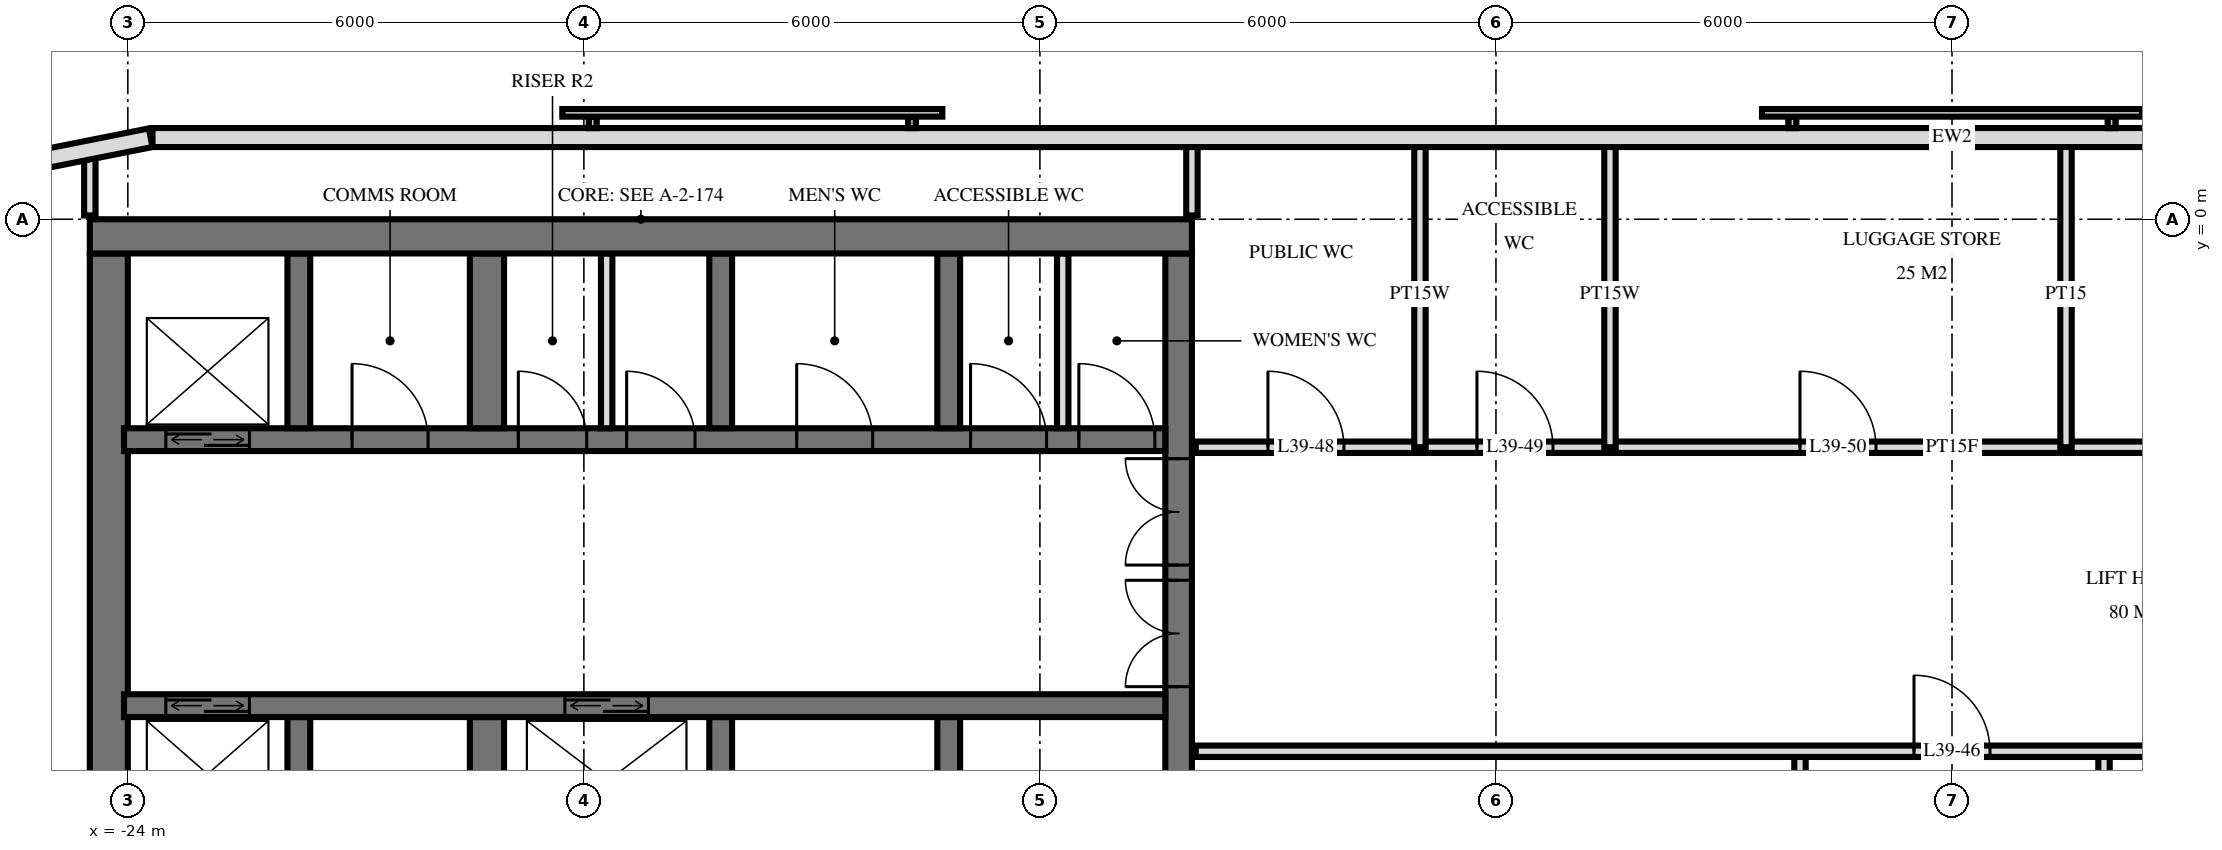
"""IFC4 building model, lengths in metres.
Left out: names, types, materials, properties, quantities, classifications, styles, units other than length and angle.
Written with IfcOpenShell. Run it as: python <this file> out.ifc"""

import sys

from ifc_helpers import new_model, si_unit, direction, frame, frame_2d, origin, place, context, subcontext, project, spatial, rectangle, extrude, element, fill, save


model = new_model("IFC4")
c1 = context("Model", 3, precision=1e-05, world=origin(), true_north=direction((0.0, 1.0)))
c2 = subcontext(c1, "Body", "Model", "MODEL_VIEW")
j1 = project(units=[si_unit("LENGTHUNIT", "METRE"), si_unit("PLANEANGLEUNIT", "RADIAN")], contexts=[c1])
p1 = place(None, origin())
s1 = spatial("IfcSite", under=j1, at=p1, CompositionType="ELEMENT")
p2 = place(p1, origin())
s2 = spatial("IfcBuilding", under=s1, at=p2, CompositionType="ELEMENT")
p3 = place(p2, frame((0.0, 0.0, 152.4)))
s3 = spatial("IfcBuildingStorey", under=s2, at=p3, CompositionType="ELEMENT", Elevation=152.4)
p4 = place(p3, frame((-24.5, -0.225, 0.0), z_axis=(0.0, 0.0, 1.0), x_axis=(1.0, 0.0, 0.0)))
e1 = element("IfcWall", 1, at=p4, inside=s3, PredefinedType="SHEAR", context=c2, shape_type="SweptSolid", body=[
    extrude(rectangle(XDim=14.5, YDim=0.45, at=frame_2d((7.25, 0.0))), origin(), (0.0, 0.0, 1.0), 3.6),
])
p5 = place(p3, frame((-10.175, -14.55, 0.0), z_axis=(0.0, 0.0, 1.0), x_axis=(0.0, 1.0, 0.0)))
e2 = element("IfcWall", 2, at=p5, inside=s3, PredefinedType="SHEAR", context=c2, shape_type="SweptSolid", body=[
    extrude(rectangle(XDim=14.1, YDim=0.35, at=frame_2d((7.05, 0.0))), origin(), (0.0, 0.0, 1.0), 3.6),
])
p6 = place(p5, frame((8.4, 0.0, 0.0)))
e3 = element("IfcOpeningElement", 3, at=p6, cuts=e2, PredefinedType="OPENING", context=c2, shape_type="SweptSolid", body=[
    extrude(rectangle(XDim=1.4, YDim=2.4, at=frame_2d((0.7, 1.2))), frame((0.0, 0.185, 0.0), z_axis=(0.0, -1.0, 0.0), x_axis=(1.0, 0.0, 0.0)), (0.0, 0.0, 1.0), 0.37),
])
p7 = place(p5, frame((10.0, 0.0, 0.0)))
e4 = element("IfcOpeningElement", 4, at=p7, cuts=e2, PredefinedType="OPENING", context=c2, shape_type="SweptSolid", body=[
    extrude(rectangle(XDim=1.4, YDim=2.4, at=frame_2d((0.7, 1.2))), frame((0.0, 0.185, 0.0), z_axis=(0.0, -1.0, 0.0), x_axis=(1.0, 0.0, 0.0)), (0.0, 0.0, 1.0), 0.37),
])
p8 = place(p5, frame((4.0, 0.0, 0.0)))
e5 = element("IfcOpeningElement", 5, at=p8, cuts=e2, PredefinedType="OPENING", context=c2, shape_type="SweptSolid", body=[
    extrude(rectangle(XDim=1.2, YDim=2.1, at=frame_2d((0.6, 1.05))), frame((0.0, 0.185, 0.0), z_axis=(0.0, -1.0, 0.0), x_axis=(1.0, 0.0, 0.0)), (0.0, 0.0, 1.0), 0.37),
])
p9 = place(p3, frame((-24.25, -14.55, 0.0), z_axis=(0.0, 0.0, 1.0), x_axis=(0.0, 1.0, 0.0)))
e6 = element("IfcWall", 6, at=p9, inside=s3, PredefinedType="SHEAR", context=c2, shape_type="SweptSolid", body=[
    extrude(rectangle(XDim=14.1, YDim=0.5, at=frame_2d((7.05, 0.0))), origin(), (0.0, 0.0, 1.0), 3.6),
])
p10 = place(p3, frame((-24.05, -2.9, 0.0), z_axis=(0.0, 0.0, 1.0), x_axis=(1.0, 0.0, 0.0)))
e7 = element("IfcWall", 7, at=p10, inside=s3, PredefinedType="SHEAR", context=c2, shape_type="SweptSolid", body=[
    extrude(rectangle(XDim=13.7, YDim=0.3, at=frame_2d((6.85, 0.0))), origin(), (0.0, 0.0, 1.0), 3.6),
])
p11 = place(p10, frame((0.55, 0.0, 0.0)))
e8 = element("IfcOpeningElement", 8, at=p11, cuts=e7, PredefinedType="OPENING", context=c2, shape_type="SweptSolid", body=[
    extrude(rectangle(XDim=1.1, YDim=2.1, at=frame_2d((0.55, 1.05))), frame((0.0, 0.16, 0.0), z_axis=(0.0, -1.0, 0.0), x_axis=(1.0, 0.0, 0.0)), (0.0, 0.0, 1.0), 0.32),
])
p12 = place(p10, frame((6.613, 0.0, 0.0)))
e9 = element("IfcOpeningElement", 9, at=p12, cuts=e7, PredefinedType="OPENING", context=c2, shape_type="SweptSolid", body=[
    extrude(rectangle(XDim=0.9, YDim=2.1, at=frame_2d((0.45, 1.05))), frame((0.0, 0.16, 0.0), z_axis=(0.0, -1.0, 0.0), x_axis=(1.0, 0.0, 0.0)), (0.0, 0.0, 1.0), 0.32),
])
p13 = place(p10, frame((5.188, 0.0, 0.0)))
e10 = element("IfcOpeningElement", 10, at=p13, cuts=e7, PredefinedType="OPENING", context=c2, shape_type="SweptSolid", body=[
    extrude(rectangle(XDim=0.9, YDim=2.1, at=frame_2d((0.45, 1.05))), frame((0.0, 0.16, 0.0), z_axis=(0.0, -1.0, 0.0), x_axis=(1.0, 0.0, 0.0)), (0.0, 0.0, 1.0), 0.32),
])
p14 = place(p10, frame((12.562, 0.0, 0.0)))
e11 = element("IfcOpeningElement", 11, at=p14, cuts=e7, PredefinedType="OPENING", context=c2, shape_type="SweptSolid", body=[
    extrude(rectangle(XDim=1.0, YDim=2.1, at=frame_2d((0.5, 1.05))), frame((0.0, 0.16, 0.0), z_axis=(0.0, -1.0, 0.0), x_axis=(1.0, 0.0, 0.0)), (0.0, 0.0, 1.0), 0.32),
])
p15 = place(p10, frame((11.137, 0.0, 0.0)))
e12 = element("IfcOpeningElement", 12, at=p15, cuts=e7, PredefinedType="OPENING", context=c2, shape_type="SweptSolid", body=[
    extrude(rectangle(XDim=1.0, YDim=2.1, at=frame_2d((0.5, 1.05))), frame((0.0, 0.16, 0.0), z_axis=(0.0, -1.0, 0.0), x_axis=(1.0, 0.0, 0.0)), (0.0, 0.0, 1.0), 0.32),
])
p16 = place(p10, frame((8.85, 0.0, 0.0)))
e13 = element("IfcOpeningElement", 13, at=p16, cuts=e7, PredefinedType="OPENING", context=c2, shape_type="SweptSolid", body=[
    extrude(rectangle(XDim=1.0, YDim=2.1, at=frame_2d((0.5, 1.05))), frame((0.0, 0.16, 0.0), z_axis=(0.0, -1.0, 0.0), x_axis=(1.0, 0.0, 0.0)), (0.0, 0.0, 1.0), 0.32),
])
p17 = place(p10, frame((3.0, 0.0, 0.0)))
e14 = element("IfcOpeningElement", 14, at=p17, cuts=e7, PredefinedType="OPENING", context=c2, shape_type="SweptSolid", body=[
    extrude(rectangle(XDim=1.0, YDim=2.1, at=frame_2d((0.5, 1.05))), frame((0.0, 0.16, 0.0), z_axis=(0.0, -1.0, 0.0), x_axis=(1.0, 0.0, 0.0)), (0.0, 0.0, 1.0), 0.32),
])
p18 = place(p3, frame((-24.05, -6.4, 0.0), z_axis=(0.0, 0.0, 1.0), x_axis=(1.0, 0.0, 0.0)))
e15 = element("IfcWall", 15, at=p18, inside=s3, PredefinedType="SHEAR", context=c2, shape_type="SweptSolid", body=[
    extrude(rectangle(XDim=13.7, YDim=0.3, at=frame_2d((6.85, 0.0))), origin(), (0.0, 0.0, 1.0), 3.6),
])
p19 = place(p18, frame((0.55, 0.0, 0.0)))
e16 = element("IfcOpeningElement", 16, at=p19, cuts=e15, PredefinedType="OPENING", context=c2, shape_type="SweptSolid", body=[
    extrude(rectangle(XDim=1.1, YDim=2.1, at=frame_2d((0.55, 1.05))), frame((0.0, 0.16, 0.0), z_axis=(0.0, -1.0, 0.0), x_axis=(1.0, 0.0, 0.0)), (0.0, 0.0, 1.0), 0.32),
])
p20 = place(p18, frame((5.8, 0.0, 0.0)))
e17 = element("IfcOpeningElement", 17, at=p20, cuts=e15, PredefinedType="OPENING", context=c2, shape_type="SweptSolid", body=[
    extrude(rectangle(XDim=1.1, YDim=2.1, at=frame_2d((0.55, 1.05))), frame((0.0, 0.16, 0.0), z_axis=(0.0, -1.0, 0.0), x_axis=(1.0, 0.0, 0.0)), (0.0, 0.0, 1.0), 0.32),
])
for number, where, z_axis, x_axis in (
    (18, (-13.2, -2.75, 0.0), (0.0, 0.0, 1.0), (0.0, 1.0, 0.0)),
    (19, (-13.2, -8.85, 0.0), (0.0, 0.0, 1.0), (0.0, 1.0, 0.0)),
    (20, (-16.2, -2.75, 0.0), (0.0, 0.0, 1.0), (0.0, 1.0, 0.0)),
    (21, (-16.2, -8.85, 0.0), (0.0, 0.0, 1.0), (0.0, 1.0, 0.0)),
):
    element("IfcWall", number, at=place(p3, frame(where, z_axis=z_axis, x_axis=x_axis)), inside=s3, PredefinedType="SHEAR", context=c2, shape_type="SweptSolid", body=[
        extrude(rectangle(XDim=2.3, YDim=0.3, at=frame_2d((1.15, 0.0))), origin(), (0.0, 0.0, 1.0), 3.6),
    ])
for number, where, z_axis, x_axis in (
    (22, (-19.275, -2.75, 0.0), (0.0, 0.0, 1.0), (0.0, 1.0, 0.0)),
    (23, (-19.275, -8.85, 0.0), (0.0, 0.0, 1.0), (0.0, 1.0, 0.0)),
):
    element("IfcWall", number, at=place(p3, frame(where, z_axis=z_axis, x_axis=x_axis)), inside=s3, PredefinedType="SHEAR", context=c2, shape_type="SweptSolid", body=[
        extrude(rectangle(XDim=2.3, YDim=0.45, at=frame_2d((1.15, 0.0))), origin(), (0.0, 0.0, 1.0), 3.6),
    ])
for number, where, z_axis, x_axis in (
    (24, (-21.75, -2.75, 0.0), (0.0, 0.0, 1.0), (0.0, 1.0, 0.0)),
    (25, (-21.75, -8.85, 0.0), (0.0, 0.0, 1.0), (0.0, 1.0, 0.0)),
):
    element("IfcWall", number, at=place(p3, frame(where, z_axis=z_axis, x_axis=x_axis)), inside=s3, PredefinedType="SHEAR", context=c2, shape_type="SweptSolid", body=[
        extrude(rectangle(XDim=2.3, YDim=0.3, at=frame_2d((1.15, 0.0))), origin(), (0.0, 0.0, 1.0), 3.6),
    ])
p21 = place(p3, frame((23.675, 1.075, 0.0), z_axis=(0.0, 0.0, 1.0), x_axis=(-1.0, 0.0, 0.0)))
e26 = element("IfcWall", 26, at=p21, inside=s3, PredefinedType="SOLIDWALL", context=c2, shape_type="SweptSolid", body=[
    extrude(rectangle(XDim=47.351, YDim=0.25, at=frame_2d((23.675, 0.0))), origin(), (0.0, 0.0, 1.0), 3.32),
])
p22 = place(p3, frame((-23.7, 1.073, 0.0), z_axis=(0.0, 0.0, 1.0), x_axis=(-0.980803419081, -0.194999110559, 0.0)))
e27 = element("IfcWall", 27, at=p22, inside=s3, PredefinedType="SOLIDWALL", context=c2, shape_type="SweptSolid", body=[
    extrude(rectangle(XDim=1.681, YDim=0.25, at=frame_2d((0.841, 0.0))), origin(), (0.0, 0.0, 1.0), 3.32),
])
for number, where, z_axis, x_axis in (
    (28, (-17.7, -2.75, 0.0), (0.0, 0.0, 1.0), (0.0, 1.0, 0.0)),
    (29, (-11.7, -2.75, 0.0), (0.0, 0.0, 1.0), (0.0, 1.0, 0.0)),
):
    element("IfcWall", number, at=place(p3, frame(where, z_axis=z_axis, x_axis=x_axis)), inside=s3, PredefinedType="PARTITIONING", context=c2, shape_type="SweptSolid", body=[
        extrude(rectangle(XDim=2.3, YDim=0.15, at=frame_2d((1.15, 0.0))), origin(), (0.0, 0.0, 1.0), 3.3),
    ])
p23 = place(p3, frame((2.0, -11.0, 0.0), z_axis=(0.0, 0.0, 1.0), x_axis=(0.0, 1.0, 0.0)))
e30 = element("IfcWall", 30, at=p23, inside=s3, PredefinedType="PARTITIONING", context=c2, shape_type="SweptSolid", body=[
    extrude(rectangle(XDim=4.0, YDim=0.15, at=frame_2d((2.0, 0.0))), origin(), (0.0, 0.0, 1.0), 3.32),
])
p24 = place(p3, frame((1.5, -3.0, 0.0), z_axis=(0.0, 0.0, 1.0), x_axis=(0.0, 1.0, 0.0)))
e31 = element("IfcWall", 31, at=p24, inside=s3, PredefinedType="PARTITIONING", context=c2, shape_type="SweptSolid", body=[
    extrude(rectangle(XDim=4.02, YDim=0.15, at=frame_2d((2.01, 0.0))), origin(), (0.0, 0.0, 1.0), 3.32),
])
p25 = place(p3, frame((-2.0, -11.0, 0.0), z_axis=(0.0, 0.0, 1.0), x_axis=(0.0, 1.0, 0.0)))
e32 = element("IfcWall", 32, at=p25, inside=s3, PredefinedType="PARTITIONING", context=c2, shape_type="SweptSolid", body=[
    extrude(rectangle(XDim=4.0, YDim=0.15, at=frame_2d((2.0, 0.0))), origin(), (0.0, 0.0, 1.0), 3.32),
])
for number, where, z_axis, x_axis in (
    (33, (-4.5, -3.0, 0.0), (0.0, 0.0, 1.0), (0.0, 1.0, 0.0)),
    (34, (-7.0, -3.0, 0.0), (0.0, 0.0, 1.0), (0.0, 1.0, 0.0)),
):
    element("IfcWall", number, at=place(p3, frame(where, z_axis=z_axis, x_axis=x_axis)), inside=s3, PredefinedType="PLUMBINGWALL", context=c2, shape_type="SweptSolid", body=[
        extrude(rectangle(XDim=4.02, YDim=0.15, at=frame_2d((2.01, 0.0))), origin(), (0.0, 0.0, 1.0), 3.32),
    ])
p26 = place(p3, frame((-10.0, 0.05, 0.0), z_axis=(0.0, 0.0, 1.0), x_axis=(0.0, 1.0, 0.0)))
e35 = element("IfcWall", 35, at=p26, inside=s3, PredefinedType="PLUMBINGWALL", context=c2, shape_type="SweptSolid", body=[
    extrude(rectangle(XDim=0.97, YDim=0.15, at=frame_2d((0.485, 0.0))), origin(), (0.0, 0.0, 1.0), 3.32),
])
p27 = place(p3, frame((-24.5, 0.05, 0.0), z_axis=(0.0, 0.0, 1.0), x_axis=(0.0, 1.0, 0.0)))
e36 = element("IfcWall", 36, at=p27, inside=s3, PredefinedType="PARTITIONING", context=c2, shape_type="SweptSolid", body=[
    extrude(rectangle(XDim=0.807, YDim=0.15, at=frame_2d((0.404, 0.0))), origin(), (0.0, 0.0, 1.0), 3.32),
])
p28 = place(p3, frame((-9.95, -7.0, 0.0), z_axis=(0.0, 0.0, 1.0), x_axis=(1.0, 0.0, 0.0)))
e37 = element("IfcWall", 37, at=p28, inside=s3, PredefinedType="PARTITIONING", context=c2, shape_type="SweptSolid", body=[
    extrude(rectangle(XDim=19.9, YDim=0.15, at=frame_2d((9.95, 0.0))), origin(), (0.0, 0.0, 1.0), 3.32),
])
p29 = place(p28, frame((9.45, 0.0, 0.0)))
e38 = element("IfcOpeningElement", 38, at=p29, cuts=e37, PredefinedType="OPENING", context=c2, shape_type="SweptSolid", body=[
    extrude(rectangle(XDim=1.0, YDim=2.1, at=frame_2d((0.5, 1.05))), frame((0.0, 0.085, 0.0), z_axis=(0.0, -1.0, 0.0), x_axis=(1.0, 0.0, 0.0)), (0.0, 0.0, 1.0), 0.17),
])
p30 = place(p28, frame((15.45, 0.0, 0.0)))
e39 = element("IfcOpeningElement", 39, at=p30, cuts=e37, PredefinedType="OPENING", context=c2, shape_type="SweptSolid", body=[
    extrude(rectangle(XDim=1.0, YDim=2.1, at=frame_2d((0.5, 1.05))), frame((0.0, 0.085, 0.0), z_axis=(0.0, -1.0, 0.0), x_axis=(1.0, 0.0, 0.0)), (0.0, 0.0, 1.0), 0.17),
])
p31 = place(p3, frame((-9.95, -3.0, 0.0), z_axis=(0.0, 0.0, 1.0), x_axis=(1.0, 0.0, 0.0)))
e40 = element("IfcWall", 40, at=p31, inside=s3, PredefinedType="PARTITIONING", context=c2, shape_type="SweptSolid", body=[
    extrude(rectangle(XDim=19.9, YDim=0.15, at=frame_2d((9.95, 0.0))), origin(), (0.0, 0.0, 1.0), 3.32),
])
p32 = place(p31, frame((0.95, 0.0, 0.0)))
e41 = element("IfcOpeningElement", 41, at=p32, cuts=e40, PredefinedType="OPENING", context=c2, shape_type="SweptSolid", body=[
    extrude(rectangle(XDim=1.0, YDim=2.1, at=frame_2d((0.5, 1.05))), frame((0.0, 0.085, 0.0), z_axis=(0.0, -1.0, 0.0), x_axis=(1.0, 0.0, 0.0)), (0.0, 0.0, 1.0), 0.17),
])
p33 = place(p31, frame((3.7, 0.0, 0.0)))
e42 = element("IfcOpeningElement", 42, at=p33, cuts=e40, PredefinedType="OPENING", context=c2, shape_type="SweptSolid", body=[
    extrude(rectangle(XDim=1.0, YDim=2.1, at=frame_2d((0.5, 1.05))), frame((0.0, 0.085, 0.0), z_axis=(0.0, -1.0, 0.0), x_axis=(1.0, 0.0, 0.0)), (0.0, 0.0, 1.0), 0.17),
])
p34 = place(p31, frame((7.95, 0.0, 0.0)))
e43 = element("IfcOpeningElement", 43, at=p34, cuts=e40, PredefinedType="OPENING", context=c2, shape_type="SweptSolid", body=[
    extrude(rectangle(XDim=1.0, YDim=2.1, at=frame_2d((0.5, 1.05))), frame((0.0, 0.085, 0.0), z_axis=(0.0, -1.0, 0.0), x_axis=(1.0, 0.0, 0.0)), (0.0, 0.0, 1.0), 0.17),
])
p35 = place(p31, frame((15.2, 0.0, 0.0)))
e44 = element("IfcOpeningElement", 44, at=p35, cuts=e40, PredefinedType="OPENING", context=c2, shape_type="SweptSolid", body=[
    extrude(rectangle(XDim=1.0, YDim=2.1, at=frame_2d((0.5, 1.05))), frame((0.0, 0.085, 0.0), z_axis=(0.0, -1.0, 0.0), x_axis=(1.0, 0.0, 0.0)), (0.0, 0.0, 1.0), 0.17),
])
p36 = place(p11, origin())
e45 = element("IfcDoor", 45, at=p36, inside=s3, OperationType="DOUBLE_DOOR_SLIDING", PredefinedType="USERDEFINED", context=c2, shape_type="SweptSolid", body=[
    extrude(rectangle(XDim=1.1, YDim=2.1, at=frame_2d((0.55, 1.05))), frame((0.0, 0.025, 0.0), z_axis=(0.0, -1.0, 0.0), x_axis=(1.0, 0.0, 0.0)), (0.0, 0.0, 1.0), 0.05),
])
fill(e8, e45)
p37 = place(p19, origin())
e46 = element("IfcDoor", 46, at=p37, inside=s3, OperationType="DOUBLE_DOOR_SLIDING", PredefinedType="USERDEFINED", context=c2, shape_type="SweptSolid", body=[
    extrude(rectangle(XDim=1.1, YDim=2.1, at=frame_2d((0.55, 1.05))), frame((0.0, 0.025, 0.0), z_axis=(0.0, -1.0, 0.0), x_axis=(1.0, 0.0, 0.0)), (0.0, 0.0, 1.0), 0.05),
])
fill(e16, e46)
p38 = place(p20, origin())
e47 = element("IfcDoor", 47, at=p38, inside=s3, OperationType="DOUBLE_DOOR_SLIDING", PredefinedType="USERDEFINED", context=c2, shape_type="SweptSolid", body=[
    extrude(rectangle(XDim=1.1, YDim=2.1, at=frame_2d((0.55, 1.05))), frame((0.0, 0.025, 0.0), z_axis=(0.0, -1.0, 0.0), x_axis=(1.0, 0.0, 0.0)), (0.0, 0.0, 1.0), 0.05),
])
fill(e17, e47)
p39 = place(p6, origin())
e48 = element("IfcDoor", 48, at=p39, inside=s3, OperationType="DOUBLE_DOOR_SINGLE_SWING", PredefinedType="DOOR", context=c2, shape_type="SweptSolid", body=[
    extrude(rectangle(XDim=1.4, YDim=2.4, at=frame_2d((0.7, 1.2))), frame((0.0, 0.025, 0.0), z_axis=(0.0, -1.0, 0.0), x_axis=(1.0, 0.0, 0.0)), (0.0, 0.0, 1.0), 0.05),
])
fill(e3, e48)
p40 = place(p7, origin())
e49 = element("IfcDoor", 49, at=p40, inside=s3, OperationType="DOUBLE_DOOR_SINGLE_SWING", PredefinedType="DOOR", context=c2, shape_type="SweptSolid", body=[
    extrude(rectangle(XDim=1.4, YDim=2.4, at=frame_2d((0.7, 1.2))), frame((0.0, 0.025, 0.0), z_axis=(0.0, -1.0, 0.0), x_axis=(1.0, 0.0, 0.0)), (0.0, 0.0, 1.0), 0.05),
])
fill(e4, e49)
p41 = place(p12, origin())
e50 = element("IfcDoor", 50, at=p41, inside=s3, OperationType="SINGLE_SWING_RIGHT", PredefinedType="DOOR", context=c2, shape_type="SweptSolid", body=[
    extrude(rectangle(XDim=0.9, YDim=2.1, at=frame_2d((0.45, 1.05))), frame((0.0, 0.025, 0.0), z_axis=(0.0, -1.0, 0.0), x_axis=(1.0, 0.0, 0.0)), (0.0, 0.0, 1.0), 0.05),
])
fill(e9, e50)
p42 = place(p13, origin())
e51 = element("IfcDoor", 51, at=p42, inside=s3, OperationType="SINGLE_SWING_RIGHT", PredefinedType="DOOR", context=c2, shape_type="SweptSolid", body=[
    extrude(rectangle(XDim=0.9, YDim=2.1, at=frame_2d((0.45, 1.05))), frame((0.0, 0.025, 0.0), z_axis=(0.0, -1.0, 0.0), x_axis=(1.0, 0.0, 0.0)), (0.0, 0.0, 1.0), 0.05),
])
fill(e10, e51)
p43 = place(p14, origin())
e52 = element("IfcDoor", 52, at=p43, inside=s3, OperationType="SINGLE_SWING_RIGHT", PredefinedType="DOOR", context=c2, shape_type="SweptSolid", body=[
    extrude(rectangle(XDim=1.0, YDim=2.1, at=frame_2d((0.5, 1.05))), frame((0.0, 0.025, 0.0), z_axis=(0.0, -1.0, 0.0), x_axis=(1.0, 0.0, 0.0)), (0.0, 0.0, 1.0), 0.05),
])
fill(e11, e52)
p44 = place(p15, origin())
e53 = element("IfcDoor", 53, at=p44, inside=s3, OperationType="SINGLE_SWING_RIGHT", PredefinedType="DOOR", context=c2, shape_type="SweptSolid", body=[
    extrude(rectangle(XDim=1.0, YDim=2.1, at=frame_2d((0.5, 1.05))), frame((0.0, 0.025, 0.0), z_axis=(0.0, -1.0, 0.0), x_axis=(1.0, 0.0, 0.0)), (0.0, 0.0, 1.0), 0.05),
])
fill(e12, e53)
p45 = place(p16, origin())
e54 = element("IfcDoor", 54, at=p45, inside=s3, OperationType="SINGLE_SWING_RIGHT", PredefinedType="DOOR", context=c2, shape_type="SweptSolid", body=[
    extrude(rectangle(XDim=1.0, YDim=2.1, at=frame_2d((0.5, 1.05))), frame((0.0, 0.025, 0.0), z_axis=(0.0, -1.0, 0.0), x_axis=(1.0, 0.0, 0.0)), (0.0, 0.0, 1.0), 0.05),
])
fill(e13, e54)
p46 = place(p17, origin())
e55 = element("IfcDoor", 55, at=p46, inside=s3, OperationType="SINGLE_SWING_RIGHT", PredefinedType="DOOR", context=c2, shape_type="SweptSolid", body=[
    extrude(rectangle(XDim=1.0, YDim=2.1, at=frame_2d((0.5, 1.05))), frame((0.0, 0.025, 0.0), z_axis=(0.0, -1.0, 0.0), x_axis=(1.0, 0.0, 0.0)), (0.0, 0.0, 1.0), 0.05),
])
fill(e14, e55)
p47 = place(p29, origin())
e56 = element("IfcDoor", 56, at=p47, inside=s3, OperationType="SINGLE_SWING_RIGHT", PredefinedType="DOOR", context=c2, shape_type="SweptSolid", body=[
    extrude(rectangle(XDim=1.0, YDim=2.1, at=frame_2d((0.5, 1.05))), frame((0.0, 0.025, 0.0), z_axis=(0.0, -1.0, 0.0), x_axis=(1.0, 0.0, 0.0)), (0.0, 0.0, 1.0), 0.05),
])
fill(e38, e56)
p48 = place(p32, origin())
e57 = element("IfcDoor", 57, at=p48, inside=s3, OperationType="SINGLE_SWING_RIGHT", PredefinedType="DOOR", context=c2, shape_type="SweptSolid", body=[
    extrude(rectangle(XDim=1.0, YDim=2.1, at=frame_2d((0.5, 1.05))), frame((0.0, 0.025, 0.0), z_axis=(0.0, -1.0, 0.0), x_axis=(1.0, 0.0, 0.0)), (0.0, 0.0, 1.0), 0.05),
])
fill(e41, e57)
p49 = place(p33, origin())
e58 = element("IfcDoor", 58, at=p49, inside=s3, OperationType="SINGLE_SWING_RIGHT", PredefinedType="DOOR", context=c2, shape_type="SweptSolid", body=[
    extrude(rectangle(XDim=1.0, YDim=2.1, at=frame_2d((0.5, 1.05))), frame((0.0, 0.025, 0.0), z_axis=(0.0, -1.0, 0.0), x_axis=(1.0, 0.0, 0.0)), (0.0, 0.0, 1.0), 0.05),
])
fill(e42, e58)
p50 = place(p34, origin())
e59 = element("IfcDoor", 59, at=p50, inside=s3, OperationType="SINGLE_SWING_RIGHT", PredefinedType="DOOR", context=c2, shape_type="SweptSolid", body=[
    extrude(rectangle(XDim=1.0, YDim=2.1, at=frame_2d((0.5, 1.05))), frame((0.0, 0.025, 0.0), z_axis=(0.0, -1.0, 0.0), x_axis=(1.0, 0.0, 0.0)), (0.0, 0.0, 1.0), 0.05),
])
fill(e43, e59)
save(model, sys.argv[1])
